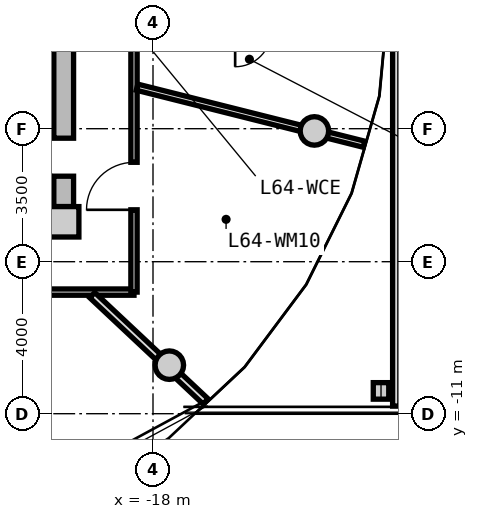
"""IFC4 building model, lengths in metres.
Left out: names, types, materials, properties, quantities, classifications, styles, units other than length and angle.
Written with IfcOpenShell. Run it as: python <this file> out.ifc"""

import sys

from ifc_helpers import new_model, si_unit, direction, frame, frame_2d, origin, origin_2d, place, context, subcontext, project, spatial, rectangle, circle, i_section, extrude, source, transform, mapped, element, fill, save


model = new_model("IFC4")
c1 = context("Model", 3, precision=1e-05, world=origin(), true_north=direction((0.0, 1.0)))
c2 = subcontext(c1, "Body", "Model", "MODEL_VIEW")
j1 = project(units=[si_unit("LENGTHUNIT", "METRE"), si_unit("PLANEANGLEUNIT", "RADIAN")], contexts=[c1])
p1 = place(None, origin())
s1 = spatial("IfcSite", under=j1, at=p1, CompositionType="ELEMENT")
p2 = place(p1, origin())
s2 = spatial("IfcBuilding", under=s1, at=p2, CompositionType="ELEMENT")
p3 = place(p2, frame((0.0, 0.0, 207.8)))
s3 = spatial("IfcBuildingStorey", under=s2, at=p3, CompositionType="ELEMENT", Elevation=207.8)
m1 = source(origin(), c2, "Body", "SweptSolid", [
    extrude(rectangle(XDim=0.8, YDim=0.8, at=origin_2d()), origin(), (0.0, 0.0, 1.0), 3.05),
])
p4 = place(p3, frame((-20.35, -5.95, 0.0), z_axis=(0.0, 0.0, 1.0), x_axis=(1.0, 0.0, 0.0)))
e1 = element("IfcColumn", 1, at=p4, inside=s3, PredefinedType="COLUMN", context=c2, shape_type="MappedRepresentation", body=[
    mapped(m1, transform((0.0, 0.0, 0.0), x_axis=(1.0, 0.0, 0.0), y_axis=(0.0, 1.0, 0.0), z_axis=(0.0, 0.0, 1.0), scale=1.0)),
])
m2 = source(origin(), c2, "Body", "SweptSolid", [
    extrude(rectangle(XDim=11.1, YDim=0.52, at=frame_2d((5.55, 0.0))), origin(), (0.0, 0.0, 1.0), 2.76),
])
p5 = place(p3, frame((-20.35, 5.55, 0.0), z_axis=(0.0, 0.0, 1.0), x_axis=(0.0, -1.0, 0.0)))
e2 = element("IfcWall", 2, at=p5, inside=s3, PredefinedType="SHEAR", context=c2, shape_type="MappedRepresentation", body=[
    mapped(m2, transform((0.0, 0.0, 0.0), x_axis=(1.0, 0.0, 0.0), y_axis=(0.0, 1.0, 0.0), z_axis=(0.0, 0.0, 1.0), scale=1.0)),
])
p6 = place(p5, frame((5.65, 0.0, 0.0)))
e3 = element("IfcOpeningElement", 3, at=p6, cuts=e2, PredefinedType="OPENING", context=c2, shape_type="SweptSolid", body=[
    extrude(rectangle(XDim=1.2, YDim=2.15, at=frame_2d((0.6, 1.075))), frame((0.0, 0.27, 0.0), z_axis=(0.0, -1.0, 0.0), x_axis=(1.0, 0.0, 0.0)), (0.0, 0.0, 1.0), 0.54),
])
p7 = place(p5, frame((9.3, 0.0, 0.0)))
e4 = element("IfcOpeningElement", 4, at=p7, cuts=e2, PredefinedType="OPENING", context=c2, shape_type="SweptSolid", body=[
    extrude(rectangle(XDim=1.0, YDim=2.1, at=frame_2d((0.5, 1.05))), frame((0.0, 0.27, 0.0), z_axis=(0.0, -1.0, 0.0), x_axis=(1.0, 0.0, 0.0)), (0.0, 0.0, 1.0), 0.54),
])
m3 = source(origin(), c2, "Body", "SweptSolid", [
    extrude(circle(Radius=0.375, at=origin_2d()), origin(), (0.0, 0.0, 1.0), 3.05),
])
for number, where, z_axis, x_axis in (
    (5, (-17.57, -9.723, 0.0), (0.0, 0.0, 1.0), (1.0, 0.0, 0.0)),
    (6, (-13.753, -3.559, 0.0), (0.0, 0.0, 1.0), (1.0, 0.0, 0.0)),
):
    element("IfcColumn", number, at=place(p3, frame(where, z_axis=z_axis, x_axis=x_axis)), inside=s3, PredefinedType="COLUMN", context=c2, shape_type="MappedRepresentation", body=[
        mapped(m3, transform((0.0, 0.0, 0.0), x_axis=(1.0, 0.0, 0.0), y_axis=(0.0, 1.0, 0.0), z_axis=(0.0, 0.0, 1.0), scale=1.0)),
    ])
m4 = source(origin(), c2, "Body", "SweptSolid", [
    extrude(i_section(OverallWidth=0.407, OverallDepth=0.435, WebThickness=0.024, FlangeThickness=0.039, FilletRadius=0.015, at=origin_2d()), origin(), (0.0, 0.0, 1.0), 3.05),
])
p8 = place(p3, frame((-12.0, -10.4, 0.0), z_axis=(0.0, 0.0, 1.0), x_axis=(1.0, 0.0, 0.0)))
e7 = element("IfcColumn", 7, at=p8, inside=s3, PredefinedType="COLUMN", context=c2, shape_type="MappedRepresentation", body=[
    mapped(m4, transform((0.0, 0.0, 0.0), x_axis=(1.0, 0.0, 0.0), y_axis=(0.0, 1.0, 0.0), z_axis=(0.0, 0.0, 1.0), scale=1.0)),
])
m5 = source(origin(), c2, "Body", "SweptSolid", [
    extrude(rectangle(XDim=19.0, YDim=0.165, at=frame_2d((9.5, 0.0))), origin(), (0.0, 0.0, 1.0), 2.745),
])
p9 = place(p3, frame((-18.5, -7.8, 0.0), z_axis=(0.0, 0.0, 1.0), x_axis=(-1.0, 0.0, 0.0)))
e8 = element("IfcWall", 8, at=p9, inside=s3, PredefinedType="PARTITIONING", context=c2, shape_type="MappedRepresentation", body=[
    mapped(m5, transform((0.0, 0.0, 0.0), x_axis=(1.0, 0.0, 0.0), y_axis=(0.0, 1.0, 0.0), z_axis=(0.0, 0.0, 1.0), scale=1.0)),
])
p10 = place(p9, frame((12.569, 0.0, 0.0)))
e9 = element("IfcOpeningElement", 9, at=p10, cuts=e8, PredefinedType="OPENING", context=c2, shape_type="SweptSolid", body=[
    extrude(rectangle(XDim=1.25, YDim=2.2, at=frame_2d((0.625, 1.1))), frame((0.0, 0.093, 0.0), z_axis=(0.0, -1.0, 0.0), x_axis=(1.0, 0.0, 0.0)), (0.0, 0.0, 1.0), 0.185),
])
p11 = place(p9, frame((8.875, 0.0, 0.0)))
e10 = element("IfcOpeningElement", 10, at=p11, cuts=e8, PredefinedType="OPENING", context=c2, shape_type="SweptSolid", body=[
    extrude(rectangle(XDim=1.25, YDim=2.2, at=frame_2d((0.625, 1.1))), frame((0.0, 0.093, 0.0), z_axis=(0.0, -1.0, 0.0), x_axis=(1.0, 0.0, 0.0)), (0.0, 0.0, 1.0), 0.185),
])
p12 = place(p9, frame((3.559, 0.0, 0.0)))
e11 = element("IfcOpeningElement", 11, at=p12, cuts=e8, PredefinedType="OPENING", context=c2, shape_type="SweptSolid", body=[
    extrude(rectangle(XDim=1.25, YDim=2.2, at=frame_2d((0.625, 1.1))), frame((0.0, 0.093, 0.0), z_axis=(0.0, -1.0, 0.0), x_axis=(1.0, 0.0, 0.0)), (0.0, 0.0, 1.0), 0.185),
])
m6 = source(origin(), c2, "Body", "SweptSolid", [
    extrude(rectangle(XDim=6.88, YDim=0.165, at=frame_2d((3.44, 0.0))), origin(), (0.0, 0.0, 1.0), 2.745),
])
p13 = place(p3, frame((-18.5, -0.92, 0.0), z_axis=(0.0, 0.0, 1.0), x_axis=(0.0, -1.0, 0.0)))
e12 = element("IfcWall", 12, at=p13, inside=s3, PredefinedType="PARTITIONING", context=c2, shape_type="MappedRepresentation", body=[
    mapped(m6, transform((0.0, 0.0, 0.0), x_axis=(1.0, 0.0, 0.0), y_axis=(0.0, 1.0, 0.0), z_axis=(0.0, 0.0, 1.0), scale=1.0)),
])
p14 = place(p13, frame((3.464, 0.0, 0.0)))
e13 = element("IfcOpeningElement", 13, at=p14, cuts=e12, PredefinedType="OPENING", context=c2, shape_type="SweptSolid", body=[
    extrude(rectangle(XDim=1.25, YDim=2.2, at=frame_2d((0.625, 1.1))), frame((0.0, 0.093, 0.0), z_axis=(0.0, -1.0, 0.0), x_axis=(1.0, 0.0, 0.0)), (0.0, 0.0, 1.0), 0.185),
])
m7 = source(origin(), c2, "Body", "SweptSolid", [
    extrude(rectangle(XDim=6.157, YDim=0.165, at=frame_2d((3.079, 0.0))), origin(), (0.0, 0.0, 1.0), 2.345),
])
p15 = place(p3, frame((-18.42, -2.407, 0.0), z_axis=(0.0, 0.0, 1.0), x_axis=(0.969840867184, -0.243738984038, 0.0)))
e14 = element("IfcWall", 14, at=p15, inside=s3, PredefinedType="PARTITIONING", context=c2, shape_type="MappedRepresentation", body=[
    mapped(m7, transform((0.0, 0.0, 0.0), x_axis=(1.0, 0.0, 0.0), y_axis=(0.0, 1.0, 0.0), z_axis=(0.0, 0.0, 1.0), scale=1.0)),
])
m8 = source(origin(), c2, "Body", "SweptSolid", [
    extrude(rectangle(XDim=4.089, YDim=0.19, at=frame_2d((2.044, 0.0))), origin(), (0.0, 0.0, 1.0), 2.345),
])
p16 = place(p3, frame((-19.598, -7.88, 0.0), z_axis=(0.0, 0.0, 1.0), x_axis=(0.729401273609, -0.684086092577, 0.0)))
e15 = element("IfcWall", 15, at=p16, inside=s3, PredefinedType="PARTITIONING", context=c2, shape_type="MappedRepresentation", body=[
    mapped(m8, transform((0.0, 0.0, 0.0), x_axis=(1.0, 0.0, 0.0), y_axis=(0.0, 1.0, 0.0), z_axis=(0.0, 0.0, 1.0), scale=1.0)),
])
m9 = source(origin(), c2, "Body", "SweptSolid", [
    extrude(rectangle(XDim=9.88, YDim=0.19, at=frame_2d((4.94, 0.0))), origin(), (0.0, 0.0, 1.0), 2.745),
])
p17 = place(p3, frame((-11.6, -10.8, 0.0), z_axis=(0.0, 0.0, 1.0), x_axis=(0.0, 1.0, 0.0)))
e16 = element("IfcWall", 16, at=p17, inside=s3, PredefinedType="PARTITIONING", context=c2, shape_type="MappedRepresentation", body=[
    mapped(m9, transform((0.0, 0.0, 0.0), x_axis=(1.0, 0.0, 0.0), y_axis=(0.0, 1.0, 0.0), z_axis=(0.0, 0.0, 1.0), scale=1.0)),
])
m10 = source(origin(), c2, "Body", "SweptSolid", [
    extrude(rectangle(XDim=1.0, YDim=2.1, at=frame_2d((0.5, 1.05))), frame((0.0, 0.025, 0.0), z_axis=(0.0, -1.0, 0.0), x_axis=(1.0, 0.0, 0.0)), (0.0, 0.0, 1.0), 0.05),
])
p18 = place(p7, frame((1.0, 0.0, 0.0), z_axis=(0.0, 0.0, 1.0), x_axis=(-1.0, 0.0, 0.0)))
e17 = element("IfcDoor", 17, at=p18, inside=s3, OperationType="SINGLE_SWING_RIGHT", PredefinedType="DOOR", context=c2, shape_type="MappedRepresentation", body=[
    mapped(m10, transform((0.0, 0.0, 0.0), x_axis=(1.0, 0.0, 0.0), y_axis=(0.0, 1.0, 0.0), z_axis=(0.0, 0.0, 1.0), scale=1.0)),
])
fill(e4, e17)
m11 = source(origin(), c2, "Body", "SweptSolid", [
    extrude(rectangle(XDim=1.25, YDim=2.2, at=frame_2d((0.625, 1.1))), frame((0.0, 0.025, 0.0), z_axis=(0.0, -1.0, 0.0), x_axis=(1.0, 0.0, 0.0)), (0.0, 0.0, 1.0), 0.05),
])
p19 = place(p14, frame((1.25, 0.0, 0.0), z_axis=(0.0, 0.0, 1.0), x_axis=(-1.0, 0.0, 0.0)))
e18 = element("IfcDoor", 18, at=p19, inside=s3, OperationType="SINGLE_SWING_LEFT", PredefinedType="DOOR", context=c2, shape_type="MappedRepresentation", body=[
    mapped(m11, transform((0.0, 0.0, 0.0), x_axis=(1.0, 0.0, 0.0), y_axis=(0.0, 1.0, 0.0), z_axis=(0.0, 0.0, 1.0), scale=1.0)),
])
fill(e13, e18)
save(model, sys.argv[1])
